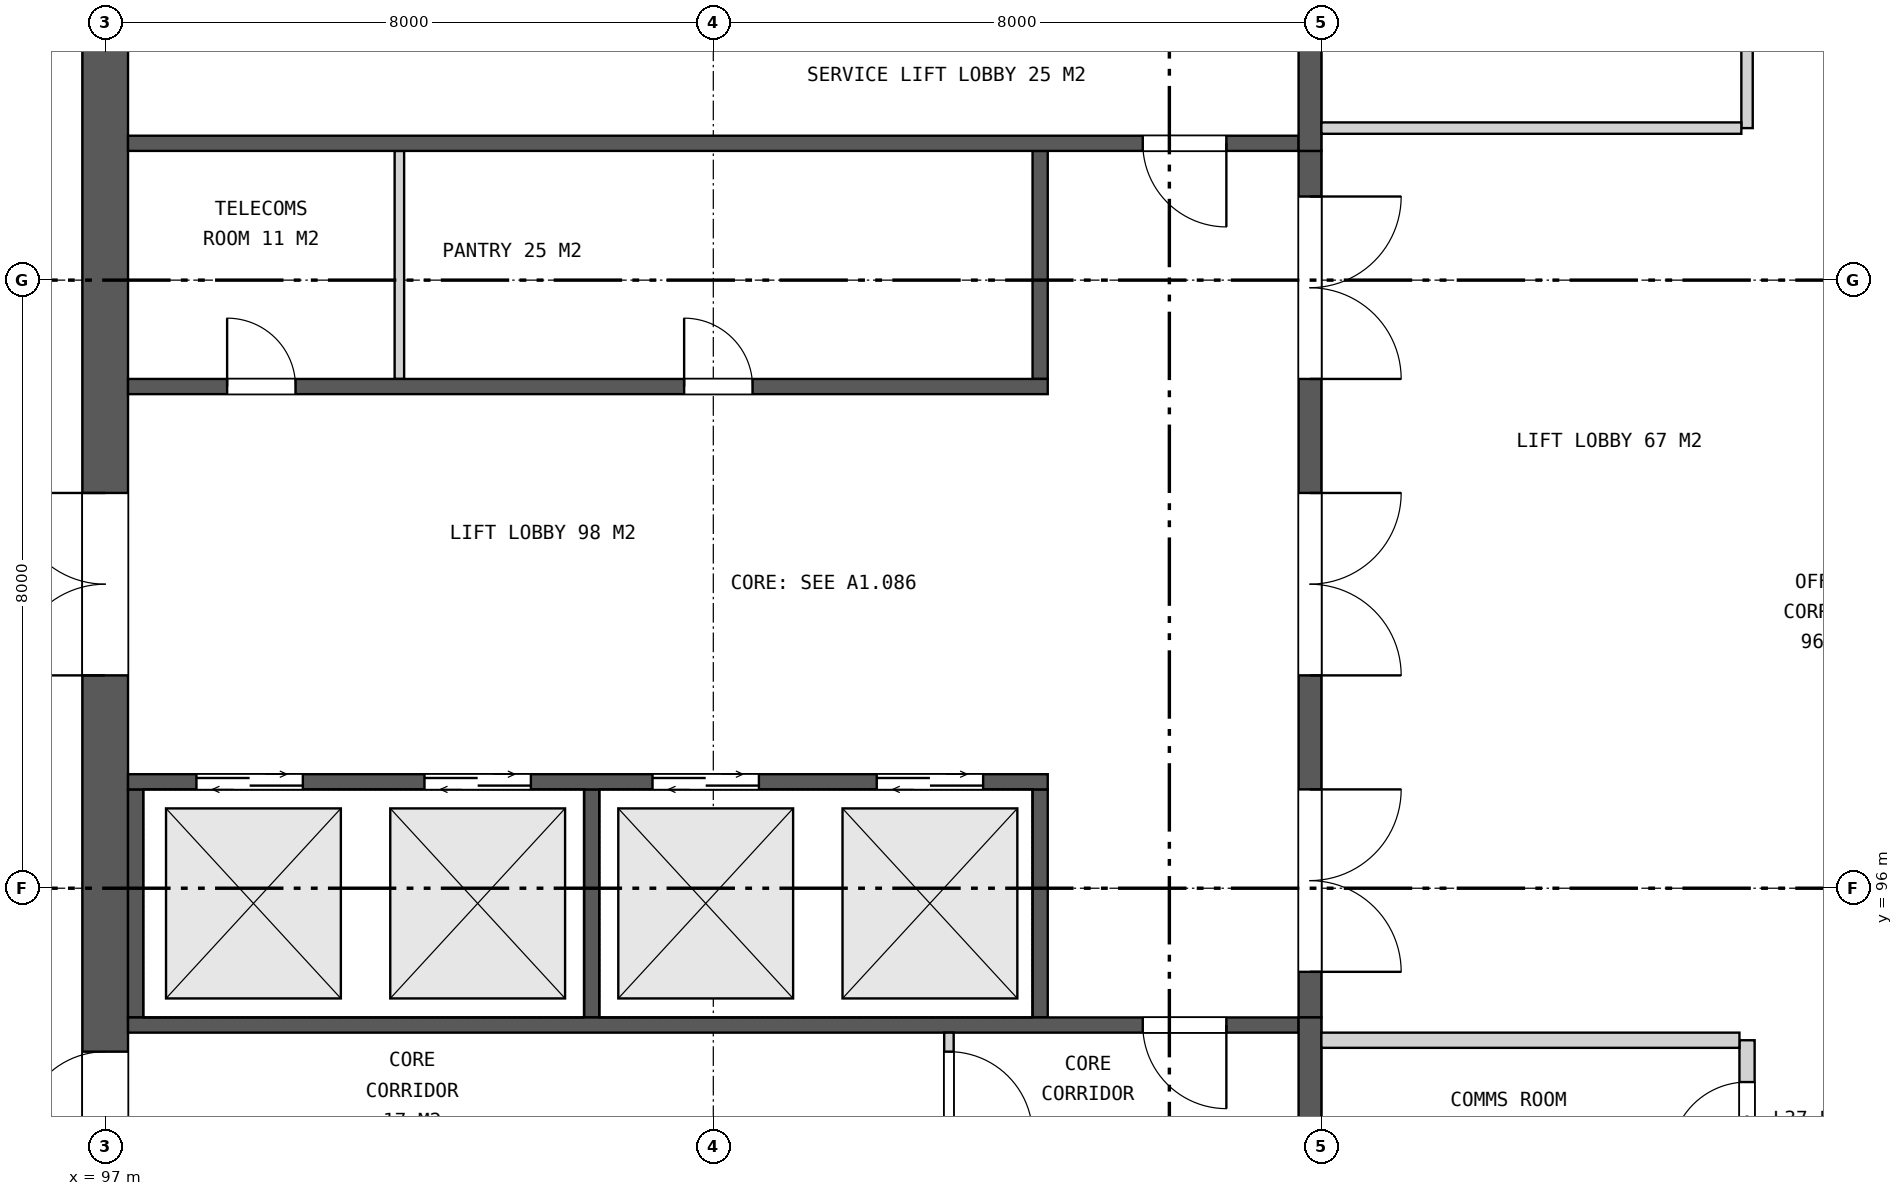
"""IFC4 building model, lengths in metres.
Left out: names, types, materials, properties, quantities, classifications, styles, units other than length and angle.
Written with IfcOpenShell. Run it as: python <this file> out.ifc"""

import sys

from ifc_helpers import new_model, si_unit, direction, frame, frame_2d, origin, place, context, subcontext, project, spatial, rectangle, extrude, element, fill, save


model = new_model("IFC4")
c1 = context("Model", 3, precision=1e-05, world=origin(), true_north=direction((0.0, 1.0)))
c2 = subcontext(c1, "Body", "Model", "MODEL_VIEW")
j1 = project(units=[si_unit("LENGTHUNIT", "METRE"), si_unit("PLANEANGLEUNIT", "RADIAN")], contexts=[c1])
p1 = place(None, origin())
s1 = spatial("IfcSite", under=j1, at=p1, CompositionType="ELEMENT")
p2 = place(p1, origin())
s2 = spatial("IfcBuilding", under=s1, at=p2, CompositionType="ELEMENT")
p3 = place(p2, frame((0.0, 0.0, 178.9)))
s3 = spatial("IfcBuildingStorey", under=s2, at=p3, CompositionType="ELEMENT", Elevation=178.9)
p4 = place(p3, frame((97.0, 111.7, 0.0), z_axis=(0.0, 0.0, 1.0), x_axis=(0.0, -1.0, 0.0)))
e1 = element("IfcWall", 1, at=p4, inside=s3, PredefinedType="SHEAR", context=c2, shape_type="SweptSolid", body=[
    extrude(rectangle(XDim=23.4, YDim=0.6, at=frame_2d((11.7, 0.0))), origin(), (0.0, 0.0, 1.0), 4.2),
])
p5 = place(p4, frame((10.5, 0.0, 0.0)))
e2 = element("IfcOpeningElement", 2, at=p5, cuts=e1, PredefinedType="OPENING", context=c2, shape_type="SweptSolid", body=[
    extrude(rectangle(XDim=2.4, YDim=2.4, at=frame_2d((1.2, 1.2))), frame((0.0, 0.31, 0.0), z_axis=(0.0, -1.0, 0.0), x_axis=(1.0, 0.0, 0.0)), (0.0, 0.0, 1.0), 0.62),
])
p6 = place(p4, frame((17.85, 0.0, 0.0)))
e3 = element("IfcOpeningElement", 3, at=p6, cuts=e1, PredefinedType="OPENING", context=c2, shape_type="SweptSolid", body=[
    extrude(rectangle(XDim=1.1, YDim=2.1, at=frame_2d((0.55, 1.05))), frame((0.0, 0.31, 0.0), z_axis=(0.0, -1.0, 0.0), x_axis=(1.0, 0.0, 0.0)), (0.0, 0.0, 1.0), 0.62),
])
p7 = place(p3, frame((112.85, 105.7, 0.0), z_axis=(0.0, 0.0, 1.0), x_axis=(0.0, -1.0, 0.0)))
e4 = element("IfcWall", 4, at=p7, inside=s3, PredefinedType="SHEAR", context=c2, shape_type="SweptSolid", body=[
    extrude(rectangle(XDim=11.4, YDim=0.3, at=frame_2d((5.7, 0.0))), origin(), (0.0, 0.0, 1.0), 4.2),
])
p8 = place(p7, frame((0.6, 0.0, 0.0)))
e5 = element("IfcOpeningElement", 5, at=p8, cuts=e4, PredefinedType="OPENING", context=c2, shape_type="SweptSolid", body=[
    extrude(rectangle(XDim=2.4, YDim=2.4, at=frame_2d((1.2, 1.2))), frame((0.0, 0.16, 0.0), z_axis=(0.0, -1.0, 0.0), x_axis=(1.0, 0.0, 0.0)), (0.0, 0.0, 1.0), 0.32),
])
p9 = place(p7, frame((4.5, 0.0, 0.0)))
e6 = element("IfcOpeningElement", 6, at=p9, cuts=e4, PredefinedType="OPENING", context=c2, shape_type="SweptSolid", body=[
    extrude(rectangle(XDim=2.4, YDim=2.4, at=frame_2d((1.2, 1.2))), frame((0.0, 0.16, 0.0), z_axis=(0.0, -1.0, 0.0), x_axis=(1.0, 0.0, 0.0)), (0.0, 0.0, 1.0), 0.32),
])
p10 = place(p7, frame((8.4, 0.0, 0.0)))
e7 = element("IfcOpeningElement", 7, at=p10, cuts=e4, PredefinedType="OPENING", context=c2, shape_type="SweptSolid", body=[
    extrude(rectangle(XDim=2.4, YDim=2.4, at=frame_2d((1.2, 1.2))), frame((0.0, 0.16, 0.0), z_axis=(0.0, -1.0, 0.0), x_axis=(1.0, 0.0, 0.0)), (0.0, 0.0, 1.0), 0.32),
])
for number, where, z_axis, x_axis in (
    (8, (109.3, 97.3, 0.0), (0.0, 0.0, 1.0), (0.0, -1.0, 0.0)),
    (9, (103.4, 97.3, 0.0), (0.0, 0.0, 1.0), (0.0, -1.0, 0.0)),
    (10, (97.4, 97.3, 0.0), (0.0, 0.0, 1.0), (0.0, -1.0, 0.0)),
):
    element("IfcWall", number, at=place(p3, frame(where, z_axis=z_axis, x_axis=x_axis)), inside=s3, PredefinedType="SHEAR", context=c2, shape_type="SweptSolid", body=[
        extrude(rectangle(XDim=3.0, YDim=0.2, at=frame_2d((1.5, 0.0))), origin(), (0.0, 0.0, 1.0), 4.2),
    ])
p11 = place(p3, frame((109.4, 97.4, 0.0), z_axis=(0.0, 0.0, 1.0), x_axis=(-1.0, 0.0, 0.0)))
e11 = element("IfcWall", 11, at=p11, inside=s3, PredefinedType="SHEAR", context=c2, shape_type="SweptSolid", body=[
    extrude(rectangle(XDim=12.1, YDim=0.2, at=frame_2d((6.05, 0.0))), origin(), (0.0, 0.0, 1.0), 4.2),
])
p12 = place(p11, frame((0.85, 0.0, 0.0)))
e12 = element("IfcOpeningElement", 12, at=p12, cuts=e11, PredefinedType="OPENING", context=c2, shape_type="SweptSolid", body=[
    extrude(rectangle(XDim=1.4, YDim=2.1, at=frame_2d((0.7, 1.05))), frame((0.0, 0.11, 0.0), z_axis=(0.0, -1.0, 0.0), x_axis=(1.0, 0.0, 0.0)), (0.0, 0.0, 1.0), 0.22),
])
p13 = place(p11, frame((3.8, 0.0, 0.0)))
e13 = element("IfcOpeningElement", 13, at=p13, cuts=e11, PredefinedType="OPENING", context=c2, shape_type="SweptSolid", body=[
    extrude(rectangle(XDim=1.4, YDim=2.1, at=frame_2d((0.7, 1.05))), frame((0.0, 0.11, 0.0), z_axis=(0.0, -1.0, 0.0), x_axis=(1.0, 0.0, 0.0)), (0.0, 0.0, 1.0), 0.22),
])
p14 = place(p11, frame((6.8, 0.0, 0.0)))
e14 = element("IfcOpeningElement", 14, at=p14, cuts=e11, PredefinedType="OPENING", context=c2, shape_type="SweptSolid", body=[
    extrude(rectangle(XDim=1.4, YDim=2.1, at=frame_2d((0.7, 1.05))), frame((0.0, 0.11, 0.0), z_axis=(0.0, -1.0, 0.0), x_axis=(1.0, 0.0, 0.0)), (0.0, 0.0, 1.0), 0.22),
])
p15 = place(p11, frame((9.8, 0.0, 0.0)))
e15 = element("IfcOpeningElement", 15, at=p15, cuts=e11, PredefinedType="OPENING", context=c2, shape_type="SweptSolid", body=[
    extrude(rectangle(XDim=1.4, YDim=2.1, at=frame_2d((0.7, 1.05))), frame((0.0, 0.11, 0.0), z_axis=(0.0, -1.0, 0.0), x_axis=(1.0, 0.0, 0.0)), (0.0, 0.0, 1.0), 0.22),
])
p16 = place(p3, frame((109.3, 105.7, 0.0), z_axis=(0.0, 0.0, 1.0), x_axis=(0.0, -1.0, 0.0)))
e16 = element("IfcWall", 16, at=p16, inside=s3, PredefinedType="SHEAR", context=c2, shape_type="SweptSolid", body=[
    extrude(rectangle(XDim=3.0, YDim=0.2, at=frame_2d((1.5, 0.0))), origin(), (0.0, 0.0, 1.0), 4.2),
])
p17 = place(p3, frame((100.87, 105.7, 0.0), z_axis=(0.0, 0.0, 1.0), x_axis=(0.0, -1.0, 0.0)))
e17 = element("IfcWall", 17, at=p17, inside=s3, PredefinedType="PARTITIONING", context=c2, shape_type="SweptSolid", body=[
    extrude(rectangle(XDim=3.0, YDim=0.125, at=frame_2d((1.5, 0.0))), origin(), (0.0, 0.0, 1.0), 4.2),
])
p18 = place(p3, frame((109.4, 102.6, 0.0), z_axis=(0.0, 0.0, 1.0), x_axis=(-1.0, 0.0, 0.0)))
e18 = element("IfcWall", 18, at=p18, inside=s3, PredefinedType="SHEAR", context=c2, shape_type="SweptSolid", body=[
    extrude(rectangle(XDim=12.1, YDim=0.2, at=frame_2d((6.05, 0.0))), origin(), (0.0, 0.0, 1.0), 4.2),
])
p19 = place(p18, frame((3.884, 0.0, 0.0)))
e19 = element("IfcOpeningElement", 19, at=p19, cuts=e18, PredefinedType="OPENING", context=c2, shape_type="SweptSolid", body=[
    extrude(rectangle(XDim=0.9, YDim=2.1, at=frame_2d((0.45, 1.05))), frame((0.0, 0.11, 0.0), z_axis=(0.0, -1.0, 0.0), x_axis=(1.0, 0.0, 0.0)), (0.0, 0.0, 1.0), 0.22),
])
p20 = place(p18, frame((9.896, 0.0, 0.0)))
e20 = element("IfcOpeningElement", 20, at=p20, cuts=e18, PredefinedType="OPENING", context=c2, shape_type="SweptSolid", body=[
    extrude(rectangle(XDim=0.9, YDim=2.1, at=frame_2d((0.45, 1.05))), frame((0.0, 0.11, 0.0), z_axis=(0.0, -1.0, 0.0), x_axis=(1.0, 0.0, 0.0)), (0.0, 0.0, 1.0), 0.22),
])
p21 = place(p3, frame((112.7, 94.2, 0.0), z_axis=(0.0, 0.0, 1.0), x_axis=(-1.0, 0.0, 0.0)))
e21 = element("IfcWall", 21, at=p21, inside=s3, PredefinedType="SHEAR", context=c2, shape_type="SweptSolid", body=[
    extrude(rectangle(XDim=15.4, YDim=0.2, at=frame_2d((7.7, 0.0))), origin(), (0.0, 0.0, 1.0), 4.2),
])
p22 = place(p21, frame((0.95, 0.0, 0.0)))
e22 = element("IfcOpeningElement", 22, at=p22, cuts=e21, PredefinedType="OPENING", context=c2, shape_type="SweptSolid", body=[
    extrude(rectangle(XDim=1.1, YDim=2.1, at=frame_2d((0.55, 1.05))), frame((0.0, 0.11, 0.0), z_axis=(0.0, -1.0, 0.0), x_axis=(1.0, 0.0, 0.0)), (0.0, 0.0, 1.0), 0.22),
])
p23 = place(p3, frame((112.85, 94.3, 0.0), z_axis=(0.0, 0.0, 1.0), x_axis=(0.0, -1.0, 0.0)))
e23 = element("IfcWall", 23, at=p23, inside=s3, PredefinedType="SHEAR", context=c2, shape_type="SweptSolid", body=[
    extrude(rectangle(XDim=6.0, YDim=0.3, at=frame_2d((3.0, 0.0))), origin(), (0.0, 0.0, 1.0), 4.2),
])
p24 = place(p3, frame((108.1, 94.1, 0.0), z_axis=(0.0, 0.0, 1.0), x_axis=(0.0, -1.0, 0.0)))
e24 = element("IfcWall", 24, at=p24, inside=s3, PredefinedType="PARTITIONING", context=c2, shape_type="SweptSolid", body=[
    extrude(rectangle(XDim=1.6, YDim=0.125, at=frame_2d((0.8, 0.0))), origin(), (0.0, 0.0, 1.0), 4.2),
])
p25 = place(p24, frame((0.25, 0.0, 0.0)))
e25 = element("IfcOpeningElement", 25, at=p25, cuts=e24, PredefinedType="OPENING", context=c2, shape_type="SweptSolid", body=[
    extrude(rectangle(XDim=1.1, YDim=2.1, at=frame_2d((0.55, 1.05))), frame((0.0, 0.073, 0.0), z_axis=(0.0, -1.0, 0.0), x_axis=(1.0, 0.0, 0.0)), (0.0, 0.0, 1.0), 0.145),
])
p26 = place(p3, frame((112.7, 105.8, 0.0), z_axis=(0.0, 0.0, 1.0), x_axis=(-1.0, 0.0, 0.0)))
e26 = element("IfcWall", 26, at=p26, inside=s3, PredefinedType="SHEAR", context=c2, shape_type="SweptSolid", body=[
    extrude(rectangle(XDim=15.4, YDim=0.2, at=frame_2d((7.7, 0.0))), origin(), (0.0, 0.0, 1.0), 4.2),
])
p27 = place(p26, frame((0.95, 0.0, 0.0)))
e27 = element("IfcOpeningElement", 27, at=p27, cuts=e26, PredefinedType="OPENING", context=c2, shape_type="SweptSolid", body=[
    extrude(rectangle(XDim=1.1, YDim=2.1, at=frame_2d((0.55, 1.05))), frame((0.0, 0.11, 0.0), z_axis=(0.0, -1.0, 0.0), x_axis=(1.0, 0.0, 0.0)), (0.0, 0.0, 1.0), 0.22),
])
p28 = place(p3, frame((112.85, 111.7, 0.0), z_axis=(0.0, 0.0, 1.0), x_axis=(0.0, -1.0, 0.0)))
e28 = element("IfcWall", 28, at=p28, inside=s3, PredefinedType="SHEAR", context=c2, shape_type="SweptSolid", body=[
    extrude(rectangle(XDim=6.0, YDim=0.3, at=frame_2d((3.0, 0.0))), origin(), (0.0, 0.0, 1.0), 4.2),
])
p29 = place(p3, frame((118.6, 80.075, 0.0), z_axis=(0.0, 0.0, 1.0), x_axis=(0.0, 1.0, 0.0)))
e29 = element("IfcWall", 29, at=p29, inside=s3, PredefinedType="SOLIDWALL", context=c2, shape_type="SweptSolid", body=[
    extrude(rectangle(XDim=13.925, YDim=0.2, at=frame_2d((6.962, 0.0))), origin(), (0.0, 0.0, 1.0), 3.44),
])
p30 = place(p29, frame((12.375, 0.0, 0.0)))
e30 = element("IfcOpeningElement", 30, at=p30, cuts=e29, PredefinedType="OPENING", context=c2, shape_type="SweptSolid", body=[
    extrude(rectangle(XDim=1.0, YDim=2.1, at=frame_2d((0.5, 1.05))), frame((0.0, 0.11, 0.0), z_axis=(0.0, -1.0, 0.0), x_axis=(1.0, 0.0, 0.0)), (0.0, 0.0, 1.0), 0.22),
])
p31 = place(p29, frame((10.375, 0.0, 0.0)))
e31 = element("IfcOpeningElement", 31, at=p31, cuts=e29, PredefinedType="OPENING", context=c2, shape_type="SweptSolid", body=[
    extrude(rectangle(XDim=1.0, YDim=2.1, at=frame_2d((0.5, 1.05))), frame((0.0, 0.11, 0.0), z_axis=(0.0, -1.0, 0.0), x_axis=(1.0, 0.0, 0.0)), (0.0, 0.0, 1.0), 0.22),
])
p32 = place(p29, frame((8.375, 0.0, 0.0)))
e32 = element("IfcOpeningElement", 32, at=p32, cuts=e29, PredefinedType="OPENING", context=c2, shape_type="SweptSolid", body=[
    extrude(rectangle(XDim=1.0, YDim=2.1, at=frame_2d((0.5, 1.05))), frame((0.0, 0.11, 0.0), z_axis=(0.0, -1.0, 0.0), x_axis=(1.0, 0.0, 0.0)), (0.0, 0.0, 1.0), 0.22),
])
p33 = place(p29, frame((3.45, 0.0, 0.0)))
e33 = element("IfcOpeningElement", 33, at=p33, cuts=e29, PredefinedType="OPENING", context=c2, shape_type="SweptSolid", body=[
    extrude(rectangle(XDim=1.0, YDim=2.1, at=frame_2d((0.5, 1.05))), frame((0.0, 0.11, 0.0), z_axis=(0.0, -1.0, 0.0), x_axis=(1.0, 0.0, 0.0)), (0.0, 0.0, 1.0), 0.22),
])
p34 = place(p3, frame((118.6, 106.0, 0.0), z_axis=(0.0, 0.0, 1.0), x_axis=(0.0, 1.0, 0.0)))
e34 = element("IfcWall", 34, at=p34, inside=s3, PredefinedType="PARTITIONING", context=c2, shape_type="SweptSolid", body=[
    extrude(rectangle(XDim=13.925, YDim=0.15, at=frame_2d((6.962, 0.0))), origin(), (0.0, 0.0, 1.0), 3.44),
])
p35 = place(p34, frame((2.45, 0.0, 0.0)))
e35 = element("IfcOpeningElement", 35, at=p35, cuts=e34, PredefinedType="OPENING", context=c2, shape_type="SweptSolid", body=[
    extrude(rectangle(XDim=1.0, YDim=2.1, at=frame_2d((0.5, 1.05))), frame((0.0, 0.085, 0.0), z_axis=(0.0, -1.0, 0.0), x_axis=(1.0, 0.0, 0.0)), (0.0, 0.0, 1.0), 0.17),
])
p36 = place(p34, frame((9.45, 0.0, 0.0)))
e36 = element("IfcOpeningElement", 36, at=p36, cuts=e34, PredefinedType="OPENING", context=c2, shape_type="SweptSolid", body=[
    extrude(rectangle(XDim=1.0, YDim=2.1, at=frame_2d((0.5, 1.05))), frame((0.0, 0.085, 0.0), z_axis=(0.0, -1.0, 0.0), x_axis=(1.0, 0.0, 0.0)), (0.0, 0.0, 1.0), 0.17),
])
p37 = place(p3, frame((113.0, 94.0, 0.0), z_axis=(0.0, 0.0, 1.0), x_axis=(1.0, 0.0, 0.0)))
e37 = element("IfcWall", 37, at=p37, inside=s3, PredefinedType="SOLIDWALL", context=c2, shape_type="SweptSolid", body=[
    extrude(rectangle(XDim=5.5, YDim=0.2, at=frame_2d((2.75, 0.0))), origin(), (0.0, 0.0, 1.0), 3.44),
])
p38 = place(p3, frame((113.0, 106.0, 0.0), z_axis=(0.0, 0.0, 1.0), x_axis=(1.0, 0.0, 0.0)))
e38 = element("IfcWall", 38, at=p38, inside=s3, PredefinedType="PARTITIONING", context=c2, shape_type="SweptSolid", body=[
    extrude(rectangle(XDim=5.525, YDim=0.15, at=frame_2d((2.762, 0.0))), origin(), (0.0, 0.0, 1.0), 3.44),
])
p39 = place(p5, frame((2.4, 0.0, 0.0), z_axis=(0.0, 0.0, 1.0), x_axis=(-1.0, 0.0, 0.0)))
e39 = element("IfcDoor", 39, at=p39, inside=s3, OperationType="DOUBLE_DOOR_SINGLE_SWING", PredefinedType="DOOR", context=c2, shape_type="SweptSolid", body=[
    extrude(rectangle(XDim=2.4, YDim=2.4, at=frame_2d((1.2, 1.2))), frame((0.0, 0.025, 0.0), z_axis=(0.0, -1.0, 0.0), x_axis=(1.0, 0.0, 0.0)), (0.0, 0.0, 1.0), 0.05),
])
fill(e2, e39)
p40 = place(p8, origin())
e40 = element("IfcDoor", 40, at=p40, inside=s3, OperationType="DOUBLE_DOOR_SINGLE_SWING", PredefinedType="DOOR", context=c2, shape_type="SweptSolid", body=[
    extrude(rectangle(XDim=2.4, YDim=2.4, at=frame_2d((1.2, 1.2))), frame((0.0, 0.025, 0.0), z_axis=(0.0, -1.0, 0.0), x_axis=(1.0, 0.0, 0.0)), (0.0, 0.0, 1.0), 0.05),
])
fill(e5, e40)
p41 = place(p9, origin())
e41 = element("IfcDoor", 41, at=p41, inside=s3, OperationType="DOUBLE_DOOR_SINGLE_SWING", PredefinedType="DOOR", context=c2, shape_type="SweptSolid", body=[
    extrude(rectangle(XDim=2.4, YDim=2.4, at=frame_2d((1.2, 1.2))), frame((0.0, 0.025, 0.0), z_axis=(0.0, -1.0, 0.0), x_axis=(1.0, 0.0, 0.0)), (0.0, 0.0, 1.0), 0.05),
])
fill(e6, e41)
p42 = place(p10, origin())
e42 = element("IfcDoor", 42, at=p42, inside=s3, OperationType="DOUBLE_DOOR_SINGLE_SWING", PredefinedType="DOOR", context=c2, shape_type="SweptSolid", body=[
    extrude(rectangle(XDim=2.4, YDim=2.4, at=frame_2d((1.2, 1.2))), frame((0.0, 0.025, 0.0), z_axis=(0.0, -1.0, 0.0), x_axis=(1.0, 0.0, 0.0)), (0.0, 0.0, 1.0), 0.05),
])
fill(e7, e42)
p43 = place(p12, origin())
e43 = element("IfcDoor", 43, at=p43, inside=s3, OperationType="DOUBLE_DOOR_SLIDING", PredefinedType="DOOR", context=c2, shape_type="SweptSolid", body=[
    extrude(rectangle(XDim=1.4, YDim=2.1, at=frame_2d((0.7, 1.05))), frame((0.0, 0.025, 0.0), z_axis=(0.0, -1.0, 0.0), x_axis=(1.0, 0.0, 0.0)), (0.0, 0.0, 1.0), 0.05),
])
fill(e12, e43)
p44 = place(p13, origin())
e44 = element("IfcDoor", 44, at=p44, inside=s3, OperationType="DOUBLE_DOOR_SLIDING", PredefinedType="DOOR", context=c2, shape_type="SweptSolid", body=[
    extrude(rectangle(XDim=1.4, YDim=2.1, at=frame_2d((0.7, 1.05))), frame((0.0, 0.025, 0.0), z_axis=(0.0, -1.0, 0.0), x_axis=(1.0, 0.0, 0.0)), (0.0, 0.0, 1.0), 0.05),
])
fill(e13, e44)
p45 = place(p14, origin())
e45 = element("IfcDoor", 45, at=p45, inside=s3, OperationType="DOUBLE_DOOR_SLIDING", PredefinedType="DOOR", context=c2, shape_type="SweptSolid", body=[
    extrude(rectangle(XDim=1.4, YDim=2.1, at=frame_2d((0.7, 1.05))), frame((0.0, 0.025, 0.0), z_axis=(0.0, -1.0, 0.0), x_axis=(1.0, 0.0, 0.0)), (0.0, 0.0, 1.0), 0.05),
])
fill(e14, e45)
p46 = place(p15, origin())
e46 = element("IfcDoor", 46, at=p46, inside=s3, OperationType="DOUBLE_DOOR_SLIDING", PredefinedType="DOOR", context=c2, shape_type="SweptSolid", body=[
    extrude(rectangle(XDim=1.4, YDim=2.1, at=frame_2d((0.7, 1.05))), frame((0.0, 0.025, 0.0), z_axis=(0.0, -1.0, 0.0), x_axis=(1.0, 0.0, 0.0)), (0.0, 0.0, 1.0), 0.05),
])
fill(e15, e46)
p47 = place(p19, frame((0.9, 0.0, 0.0), z_axis=(0.0, 0.0, 1.0), x_axis=(-1.0, 0.0, 0.0)))
e47 = element("IfcDoor", 47, at=p47, inside=s3, OperationType="SINGLE_SWING_LEFT", PredefinedType="DOOR", context=c2, shape_type="SweptSolid", body=[
    extrude(rectangle(XDim=0.9, YDim=2.1, at=frame_2d((0.45, 1.05))), frame((0.0, 0.025, 0.0), z_axis=(0.0, -1.0, 0.0), x_axis=(1.0, 0.0, 0.0)), (0.0, 0.0, 1.0), 0.05),
])
fill(e19, e47)
p48 = place(p20, frame((0.9, 0.0, 0.0), z_axis=(0.0, 0.0, 1.0), x_axis=(-1.0, 0.0, 0.0)))
e48 = element("IfcDoor", 48, at=p48, inside=s3, OperationType="SINGLE_SWING_LEFT", PredefinedType="DOOR", context=c2, shape_type="SweptSolid", body=[
    extrude(rectangle(XDim=0.9, YDim=2.1, at=frame_2d((0.45, 1.05))), frame((0.0, 0.025, 0.0), z_axis=(0.0, -1.0, 0.0), x_axis=(1.0, 0.0, 0.0)), (0.0, 0.0, 1.0), 0.05),
])
fill(e20, e48)
p49 = place(p22, origin())
e49 = element("IfcDoor", 49, at=p49, inside=s3, OperationType="SINGLE_SWING_LEFT", PredefinedType="DOOR", context=c2, shape_type="SweptSolid", body=[
    extrude(rectangle(XDim=1.1, YDim=2.1, at=frame_2d((0.55, 1.05))), frame((0.0, 0.025, 0.0), z_axis=(0.0, -1.0, 0.0), x_axis=(1.0, 0.0, 0.0)), (0.0, 0.0, 1.0), 0.05),
])
fill(e22, e49)
p50 = place(p25, origin())
e50 = element("IfcDoor", 50, at=p50, inside=s3, OperationType="SINGLE_SWING_RIGHT", PredefinedType="DOOR", context=c2, shape_type="SweptSolid", body=[
    extrude(rectangle(XDim=1.1, YDim=2.1, at=frame_2d((0.55, 1.05))), frame((0.0, 0.025, 0.0), z_axis=(0.0, -1.0, 0.0), x_axis=(1.0, 0.0, 0.0)), (0.0, 0.0, 1.0), 0.05),
])
fill(e25, e50)
p51 = place(p27, origin())
e51 = element("IfcDoor", 51, at=p51, inside=s3, OperationType="SINGLE_SWING_LEFT", PredefinedType="DOOR", context=c2, shape_type="SweptSolid", body=[
    extrude(rectangle(XDim=1.1, YDim=2.1, at=frame_2d((0.55, 1.05))), frame((0.0, 0.025, 0.0), z_axis=(0.0, -1.0, 0.0), x_axis=(1.0, 0.0, 0.0)), (0.0, 0.0, 1.0), 0.05),
])
fill(e27, e51)
p52 = place(p6, frame((1.1, 0.0, 0.0), z_axis=(0.0, 0.0, 1.0), x_axis=(-1.0, 0.0, 0.0)))
e52 = element("IfcDoor", 52, at=p52, inside=s3, OperationType="SINGLE_SWING_LEFT", PredefinedType="DOOR", context=c2, shape_type="SweptSolid", body=[
    extrude(rectangle(XDim=1.1, YDim=2.1, at=frame_2d((0.55, 1.05))), frame((0.0, 0.025, 0.0), z_axis=(0.0, -1.0, 0.0), x_axis=(1.0, 0.0, 0.0)), (0.0, 0.0, 1.0), 0.05),
])
fill(e3, e52)
p53 = place(p30, origin())
e53 = element("IfcDoor", 53, at=p53, inside=s3, OperationType="SINGLE_SWING_LEFT", PredefinedType="DOOR", context=c2, shape_type="SweptSolid", body=[
    extrude(rectangle(XDim=1.0, YDim=2.1, at=frame_2d((0.5, 1.05))), frame((0.0, 0.025, 0.0), z_axis=(0.0, -1.0, 0.0), x_axis=(1.0, 0.0, 0.0)), (0.0, 0.0, 1.0), 0.05),
])
fill(e30, e53)
save(model, sys.argv[1])
